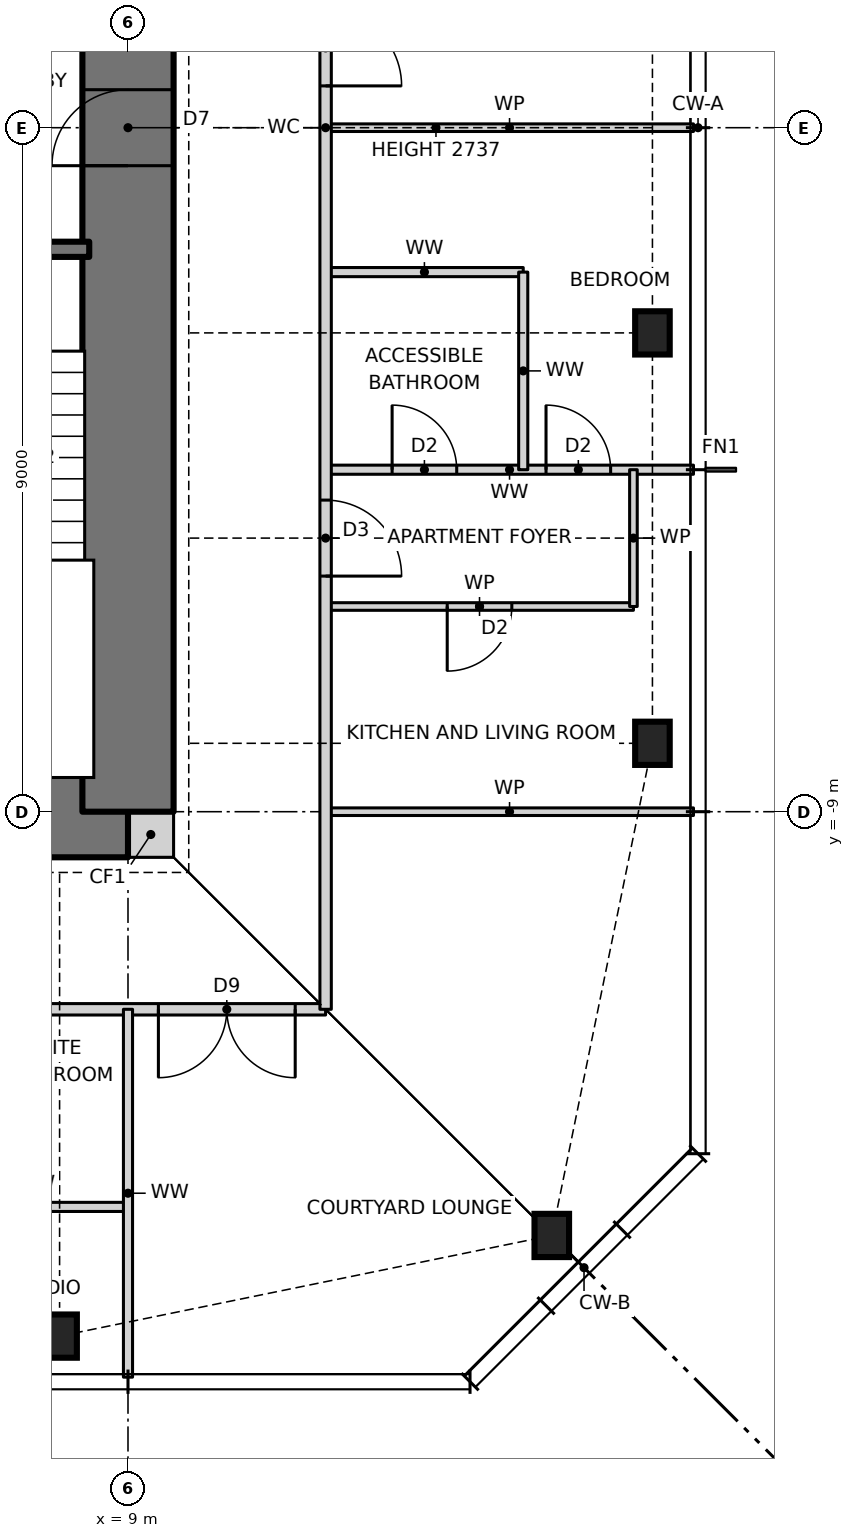
"""IFC4 building model, lengths in metres.
Left out: names, types, materials, properties, quantities, classifications, styles, units other than length and angle.
Written with IfcOpenShell. Run it as: python <this file> out.ifc"""

import sys

from ifc_helpers import new_model, si_unit, direction, frame, frame_2d, origin, origin_2d, place, context, subcontext, project, spatial, rectangle, i_section, extrude, element, fill, save


model = new_model("IFC4")
c1 = context("Model", 3, precision=1e-05, world=origin(), true_north=direction((0.0, 1.0)))
c2 = subcontext(c1, "Body", "Model", "MODEL_VIEW")
j1 = project(units=[si_unit("LENGTHUNIT", "METRE"), si_unit("PLANEANGLEUNIT", "RADIAN")], contexts=[c1])
p1 = place(None, origin())
s1 = spatial("IfcSite", under=j1, at=p1, CompositionType="ELEMENT")
p2 = place(p1, origin())
s2 = spatial("IfcBuilding", under=s1, at=p2, CompositionType="ELEMENT")
p3 = place(p2, frame((0.0, 0.0, 225.5)))
s3 = spatial("IfcBuildingStorey", under=s2, at=p3, CompositionType="ELEMENT", Elevation=225.5)
for number, where, z_axis, x_axis in (
    (1, (8.1, -15.9, 0.0), (0.0, 0.0, 1.0), (1.0, 0.0, 0.0)),
    (2, (14.576, -14.576, 0.0), (0.0, 0.0, 1.0), (1.0, 0.0, 0.0)),
    (3, (15.9, -8.1, 0.0), (0.0, 0.0, 1.0), (1.0, 0.0, 0.0)),
    (4, (15.9, -2.7, 0.0), (0.0, 0.0, 1.0), (1.0, 0.0, 0.0)),
):
    element("IfcColumn", number, at=place(p3, frame(where, z_axis=z_axis, x_axis=x_axis)), inside=s3, PredefinedType="COLUMN", context=c2, shape_type="SweptSolid", body=[
        extrude(i_section(OverallWidth=0.455, OverallDepth=0.569, WebThickness=0.078, FlangeThickness=0.125, at=origin_2d()), origin(), (0.0, 0.0, 1.0), 3.5),
    ])
p4 = place(p3, frame((9.0, -9.3, 0.0), z_axis=(0.0, 0.0, 1.0), x_axis=(1.0, 0.0, 0.0)))
e5 = element("IfcWall", 5, at=p4, inside=s3, PredefinedType="SOLIDWALL", context=c2, shape_type="SweptSolid", body=[
    extrude(rectangle(XDim=0.6, YDim=0.6, at=frame_2d((0.3, 0.0))), origin(), (0.0, 0.0, 1.0), 3.5),
])
p5 = place(p3, frame((-9.0, -9.0, 0.0), z_axis=(0.0, 0.0, 1.0), x_axis=(1.0, 0.0, 0.0)))
e6 = element("IfcWall", 6, at=p5, inside=s3, PredefinedType="SHEAR", context=c2, shape_type="SweptSolid", body=[
    extrude(rectangle(XDim=18.0, YDim=1.2, at=frame_2d((9.0, 0.0))), origin(), (0.0, 0.0, 1.0), 3.5),
])
p6 = place(p5, frame((3.775, 0.0, 0.0)))
e7 = element("IfcOpeningElement", 7, at=p6, cuts=e6, PredefinedType="OPENING", context=c2, shape_type="SweptSolid", body=[
    extrude(rectangle(XDim=0.9, YDim=2.1, at=frame_2d((0.45, 1.05))), frame((0.0, 0.61, 0.0), z_axis=(0.0, -1.0, 0.0), x_axis=(1.0, 0.0, 0.0)), (0.0, 0.0, 1.0), 1.22),
])
p7 = place(p5, frame((10.625, 0.0, 0.0)))
e8 = element("IfcOpeningElement", 8, at=p7, cuts=e6, PredefinedType="OPENING", context=c2, shape_type="SweptSolid", body=[
    extrude(rectangle(XDim=0.9, YDim=2.1, at=frame_2d((0.45, 1.05))), frame((0.0, 0.61, 0.0), z_axis=(0.0, -1.0, 0.0), x_axis=(1.0, 0.0, 0.0)), (0.0, 0.0, 1.0), 1.22),
])
p8 = place(p3, frame((9.0, -9.0, 0.0), z_axis=(0.0, 0.0, 1.0), x_axis=(0.0, 1.0, 0.0)))
e9 = element("IfcWall", 9, at=p8, inside=s3, PredefinedType="SHEAR", context=c2, shape_type="SweptSolid", body=[
    extrude(rectangle(XDim=18.0, YDim=1.2, at=frame_2d((9.0, 0.0))), origin(), (0.0, 0.0, 1.0), 3.5),
])
p9 = place(p8, frame((8.5, 0.0, 0.0)))
e10 = element("IfcOpeningElement", 10, at=p9, cuts=e9, PredefinedType="OPENING", context=c2, shape_type="SweptSolid", body=[
    extrude(rectangle(XDim=1.0, YDim=2.1, at=frame_2d((0.5, 1.05))), frame((0.0, 0.61, 0.0), z_axis=(0.0, -1.0, 0.0), x_axis=(1.0, 0.0, 0.0)), (0.0, 0.0, 1.0), 1.22),
])
p10 = place(p3, frame((6.6, -14.2, 0.0), z_axis=(0.0, 0.0, 1.0), x_axis=(1.0, 0.0, 0.0)))
e11 = element("IfcWall", 11, at=p10, inside=s3, PredefinedType="PARTITIONING", context=c2, shape_type="SweptSolid", body=[
    extrude(rectangle(XDim=2.4, YDim=0.12, at=frame_2d((1.2, 0.0))), origin(), (0.0, 0.0, 1.0), 3.27),
])
p11 = place(p3, frame((-11.6, -11.6, 0.0), z_axis=(0.0, 0.0, 1.0), x_axis=(1.0, 0.0, 0.0)))
e12 = element("IfcWall", 12, at=p11, inside=s3, PredefinedType="PARTITIONING", context=c2, shape_type="SweptSolid", body=[
    extrude(rectangle(XDim=23.2, YDim=0.15, at=frame_2d((11.6, 0.0))), origin(), (0.0, 0.0, 1.0), 3.27),
])
p12 = place(p11, frame((5.55, 0.0, 0.0)))
e13 = element("IfcOpeningElement", 13, at=p12, cuts=e12, PredefinedType="OPENING", context=c2, shape_type="SweptSolid", body=[
    extrude(rectangle(XDim=1.0, YDim=2.1, at=frame_2d((0.5, 1.05))), frame((0.0, 0.085, 0.0), z_axis=(0.0, -1.0, 0.0), x_axis=(1.0, 0.0, 0.0)), (0.0, 0.0, 1.0), 0.17),
])
p13 = place(p11, frame((7.65, 0.0, 0.0)))
e14 = element("IfcOpeningElement", 14, at=p13, cuts=e12, PredefinedType="OPENING", context=c2, shape_type="SweptSolid", body=[
    extrude(rectangle(XDim=1.0, YDim=2.1, at=frame_2d((0.5, 1.05))), frame((0.0, 0.085, 0.0), z_axis=(0.0, -1.0, 0.0), x_axis=(1.0, 0.0, 0.0)), (0.0, 0.0, 1.0), 0.17),
])
p14 = place(p11, frame((14.55, 0.0, 0.0)))
e15 = element("IfcOpeningElement", 15, at=p14, cuts=e12, PredefinedType="OPENING", context=c2, shape_type="SweptSolid", body=[
    extrude(rectangle(XDim=1.0, YDim=2.1, at=frame_2d((0.5, 1.05))), frame((0.0, 0.085, 0.0), z_axis=(0.0, -1.0, 0.0), x_axis=(1.0, 0.0, 0.0)), (0.0, 0.0, 1.0), 0.17),
])
p15 = place(p11, frame((16.65, 0.0, 0.0)))
e16 = element("IfcOpeningElement", 16, at=p15, cuts=e12, PredefinedType="OPENING", context=c2, shape_type="SweptSolid", body=[
    extrude(rectangle(XDim=1.0, YDim=2.1, at=frame_2d((0.5, 1.05))), frame((0.0, 0.085, 0.0), z_axis=(0.0, -1.0, 0.0), x_axis=(1.0, 0.0, 0.0)), (0.0, 0.0, 1.0), 0.17),
])
p16 = place(p11, frame((21.0, 0.0, 0.0)))
e17 = element("IfcOpeningElement", 17, at=p16, cuts=e12, PredefinedType="OPENING", context=c2, shape_type="SweptSolid", body=[
    extrude(rectangle(XDim=1.8, YDim=2.1, at=frame_2d((0.9, 1.05))), frame((0.0, 0.085, 0.0), z_axis=(0.0, -1.0, 0.0), x_axis=(1.0, 0.0, 0.0)), (0.0, 0.0, 1.0), 0.17),
])
p17 = place(p3, frame((11.6, -9.0, 0.0), z_axis=(0.0, 0.0, 1.0), x_axis=(1.0, 0.0, 0.0)))
e18 = element("IfcWall", 18, at=p17, inside=s3, PredefinedType="PARTITIONING", context=c2, shape_type="SweptSolid", body=[
    extrude(rectangle(XDim=4.84, YDim=0.1, at=frame_2d((2.42, 0.0))), origin(), (0.0, 0.0, 1.0), 3.27),
])
p18 = place(p3, frame((11.6, -6.3, 0.0), z_axis=(0.0, 0.0, 1.0), x_axis=(1.0, 0.0, 0.0)))
e19 = element("IfcWall", 19, at=p18, inside=s3, PredefinedType="PARTITIONING", context=c2, shape_type="SweptSolid", body=[
    extrude(rectangle(XDim=4.05, YDim=0.1, at=frame_2d((2.025, 0.0))), origin(), (0.0, 0.0, 1.0), 3.27),
])
p19 = place(p18, frame((1.6, 0.0, 0.0)))
e20 = element("IfcOpeningElement", 20, at=p19, cuts=e19, PredefinedType="OPENING", context=c2, shape_type="SweptSolid", body=[
    extrude(rectangle(XDim=0.85, YDim=2.1, at=frame_2d((0.425, 1.05))), frame((0.0, 0.06, 0.0), z_axis=(0.0, -1.0, 0.0), x_axis=(1.0, 0.0, 0.0)), (0.0, 0.0, 1.0), 0.12),
])
p20 = place(p3, frame((11.6, -4.5, 0.0), z_axis=(0.0, 0.0, 1.0), x_axis=(1.0, 0.0, 0.0)))
e21 = element("IfcWall", 21, at=p20, inside=s3, PredefinedType="PARTITIONING", context=c2, shape_type="SweptSolid", body=[
    extrude(rectangle(XDim=4.84, YDim=0.12, at=frame_2d((2.42, 0.0))), origin(), (0.0, 0.0, 1.0), 3.27),
])
p21 = place(p20, frame((2.9, 0.0, 0.0)))
e22 = element("IfcOpeningElement", 22, at=p21, cuts=e21, PredefinedType="OPENING", context=c2, shape_type="SweptSolid", body=[
    extrude(rectangle(XDim=0.85, YDim=2.1, at=frame_2d((0.425, 1.05))), frame((0.0, 0.07, 0.0), z_axis=(0.0, -1.0, 0.0), x_axis=(1.0, 0.0, 0.0)), (0.0, 0.0, 1.0), 0.14),
])
p22 = place(p20, frame((0.875, 0.0, 0.0)))
e23 = element("IfcOpeningElement", 23, at=p22, cuts=e21, PredefinedType="OPENING", context=c2, shape_type="SweptSolid", body=[
    extrude(rectangle(XDim=0.85, YDim=2.1, at=frame_2d((0.425, 1.05))), frame((0.0, 0.07, 0.0), z_axis=(0.0, -1.0, 0.0), x_axis=(1.0, 0.0, 0.0)), (0.0, 0.0, 1.0), 0.14),
])
p23 = place(p3, frame((11.6, -1.9, 0.0), z_axis=(0.0, 0.0, 1.0), x_axis=(1.0, 0.0, 0.0)))
e24 = element("IfcWall", 24, at=p23, inside=s3, PredefinedType="PARTITIONING", context=c2, shape_type="SweptSolid", body=[
    extrude(rectangle(XDim=2.6, YDim=0.12, at=frame_2d((1.3, 0.0))), origin(), (0.0, 0.0, 1.0), 3.27),
])
p24 = place(p3, frame((-8.49, -1.6, 0.0), z_axis=(0.0, 0.0, 1.0), x_axis=(1.0, 0.0, 0.0)))
e25 = element("IfcWall", 25, at=p24, inside=s3, PredefinedType="SOLIDWALL", context=c2, shape_type="SweptSolid", body=[
    extrude(rectangle(XDim=16.98, YDim=0.2, at=frame_2d((8.49, 0.0))), origin(), (0.0, 0.0, 1.0), 3.5),
])
p25 = place(p24, frame((14.81, 0.0, 0.0)))
e26 = element("IfcOpeningElement", 26, at=p25, cuts=e25, PredefinedType="OPENING", context=c2, shape_type="SweptSolid", body=[
    extrude(rectangle(XDim=1.0, YDim=2.1, at=frame_2d((0.5, 1.05))), frame((0.0, 0.11, 0.0), z_axis=(0.0, -1.0, 0.0), x_axis=(1.0, 0.0, 0.0)), (0.0, 0.0, 1.0), 0.22),
])
p26 = place(p24, frame((1.232, 0.0, 0.0)))
e27 = element("IfcOpeningElement", 27, at=p26, cuts=e25, PredefinedType="OPENING", context=c2, shape_type="SweptSolid", body=[
    extrude(rectangle(XDim=0.9, YDim=2.1, at=frame_2d((0.45, 1.05))), frame((0.0, 0.11, 0.0), z_axis=(0.0, -1.0, 0.0), x_axis=(1.0, 0.0, 0.0)), (0.0, 0.0, 1.0), 0.22),
])
p27 = place(p24, frame((4.627, 0.0, 0.0)))
e28 = element("IfcOpeningElement", 28, at=p27, cuts=e25, PredefinedType="OPENING", context=c2, shape_type="SweptSolid", body=[
    extrude(rectangle(XDim=0.9, YDim=2.1, at=frame_2d((0.45, 1.05))), frame((0.0, 0.11, 0.0), z_axis=(0.0, -1.0, 0.0), x_axis=(1.0, 0.0, 0.0)), (0.0, 0.0, 1.0), 0.22),
])
p28 = place(p24, frame((8.052, 0.0, 0.0)))
e29 = element("IfcOpeningElement", 29, at=p28, cuts=e25, PredefinedType="OPENING", context=c2, shape_type="SweptSolid", body=[
    extrude(rectangle(XDim=0.9, YDim=2.1, at=frame_2d((0.45, 1.05))), frame((0.0, 0.11, 0.0), z_axis=(0.0, -1.0, 0.0), x_axis=(1.0, 0.0, 0.0)), (0.0, 0.0, 1.0), 0.22),
])
p29 = place(p24, frame((11.478, 0.0, 0.0)))
e30 = element("IfcOpeningElement", 30, at=p29, cuts=e25, PredefinedType="OPENING", context=c2, shape_type="SweptSolid", body=[
    extrude(rectangle(XDim=0.9, YDim=2.1, at=frame_2d((0.45, 1.05))), frame((0.0, 0.11, 0.0), z_axis=(0.0, -1.0, 0.0), x_axis=(1.0, 0.0, 0.0)), (0.0, 0.0, 1.0), 0.22),
])
p30 = place(p3, frame((11.6, 0.0, 0.0), z_axis=(0.0, 0.0, 1.0), x_axis=(1.0, 0.0, 0.0)))
e31 = element("IfcWall", 31, at=p30, inside=s3, PredefinedType="PARTITIONING", context=c2, shape_type="SweptSolid", body=[
    extrude(rectangle(XDim=4.84, YDim=0.1, at=frame_2d((2.42, 0.0))), origin(), (0.0, 0.0, 1.0), 2.737),
])
p31 = place(p3, frame((15.65, -6.3, 0.0), z_axis=(0.0, 0.0, 1.0), x_axis=(0.0, 1.0, 0.0)))
e32 = element("IfcWall", 32, at=p31, inside=s3, PredefinedType="PARTITIONING", context=c2, shape_type="SweptSolid", body=[
    extrude(rectangle(XDim=1.8, YDim=0.1, at=frame_2d((0.9, 0.0))), origin(), (0.0, 0.0, 1.0), 3.27),
])
p32 = place(p3, frame((14.2, -4.5, 0.0), z_axis=(0.0, 0.0, 1.0), x_axis=(0.0, 1.0, 0.0)))
e33 = element("IfcWall", 33, at=p32, inside=s3, PredefinedType="PARTITIONING", context=c2, shape_type="SweptSolid", body=[
    extrude(rectangle(XDim=2.6, YDim=0.12, at=frame_2d((1.3, 0.0))), origin(), (0.0, 0.0, 1.0), 3.27),
])
p33 = place(p3, frame((11.6, -11.6, 0.0), z_axis=(0.0, 0.0, 1.0), x_axis=(0.0, 1.0, 0.0)))
e34 = element("IfcWall", 34, at=p33, inside=s3, PredefinedType="PARTITIONING", context=c2, shape_type="SweptSolid", body=[
    extrude(rectangle(XDim=23.2, YDim=0.15, at=frame_2d((11.6, 0.0))), origin(), (0.0, 0.0, 1.0), 3.27),
])
p34 = place(p33, frame((5.7, 0.0, 0.0)))
e35 = element("IfcOpeningElement", 35, at=p34, cuts=e34, PredefinedType="OPENING", context=c2, shape_type="SweptSolid", body=[
    extrude(rectangle(XDim=1.0, YDim=2.1, at=frame_2d((0.5, 1.05))), frame((0.0, 0.085, 0.0), z_axis=(0.0, -1.0, 0.0), x_axis=(1.0, 0.0, 0.0)), (0.0, 0.0, 1.0), 0.17),
])
p35 = place(p33, frame((12.15, 0.0, 0.0)))
e36 = element("IfcOpeningElement", 36, at=p35, cuts=e34, PredefinedType="OPENING", context=c2, shape_type="SweptSolid", body=[
    extrude(rectangle(XDim=1.0, YDim=2.1, at=frame_2d((0.5, 1.05))), frame((0.0, 0.085, 0.0), z_axis=(0.0, -1.0, 0.0), x_axis=(1.0, 0.0, 0.0)), (0.0, 0.0, 1.0), 0.17),
])
p36 = place(p33, frame((19.05, 0.0, 0.0)))
e37 = element("IfcOpeningElement", 37, at=p36, cuts=e34, PredefinedType="OPENING", context=c2, shape_type="SweptSolid", body=[
    extrude(rectangle(XDim=1.0, YDim=2.1, at=frame_2d((0.5, 1.05))), frame((0.0, 0.085, 0.0), z_axis=(0.0, -1.0, 0.0), x_axis=(1.0, 0.0, 0.0)), (0.0, 0.0, 1.0), 0.17),
])
p37 = place(p33, frame((21.0, 0.0, 0.0)))
e38 = element("IfcOpeningElement", 38, at=p37, cuts=e34, PredefinedType="OPENING", context=c2, shape_type="SweptSolid", body=[
    extrude(rectangle(XDim=1.8, YDim=2.1, at=frame_2d((0.9, 1.05))), frame((0.0, 0.085, 0.0), z_axis=(0.0, -1.0, 0.0), x_axis=(1.0, 0.0, 0.0)), (0.0, 0.0, 1.0), 0.17),
])
p38 = place(p3, frame((9.0, -16.44, 0.0), z_axis=(0.0, 0.0, 1.0), x_axis=(0.0, 1.0, 0.0)))
e39 = element("IfcWall", 39, at=p38, inside=s3, PredefinedType="PARTITIONING", context=c2, shape_type="SweptSolid", body=[
    extrude(rectangle(XDim=4.84, YDim=0.12, at=frame_2d((2.42, 0.0))), origin(), (0.0, 0.0, 1.0), 3.27),
])
p39 = place(p34, frame((1.0, 0.0, 0.0), z_axis=(0.0, 0.0, 1.0), x_axis=(-1.0, 0.0, 0.0)))
e40 = element("IfcDoor", 40, at=p39, inside=s3, OperationType="SINGLE_SWING_RIGHT", PredefinedType="DOOR", context=c2, shape_type="SweptSolid", body=[
    extrude(rectangle(XDim=1.0, YDim=2.1, at=frame_2d((0.5, 1.05))), frame((0.0, 0.025, 0.0), z_axis=(0.0, -1.0, 0.0), x_axis=(1.0, 0.0, 0.0)), (0.0, 0.0, 1.0), 0.05),
])
fill(e35, e40)
p40 = place(p19, frame((0.85, 0.0, 0.0), z_axis=(0.0, 0.0, 1.0), x_axis=(-1.0, 0.0, 0.0)))
e41 = element("IfcDoor", 41, at=p40, inside=s3, OperationType="SINGLE_SWING_RIGHT", PredefinedType="DOOR", context=c2, shape_type="SweptSolid", body=[
    extrude(rectangle(XDim=0.85, YDim=2.1, at=frame_2d((0.425, 1.05))), frame((0.0, 0.025, 0.0), z_axis=(0.0, -1.0, 0.0), x_axis=(1.0, 0.0, 0.0)), (0.0, 0.0, 1.0), 0.05),
])
fill(e20, e41)
p41 = place(p21, origin())
e42 = element("IfcDoor", 42, at=p41, inside=s3, OperationType="SINGLE_SWING_LEFT", PredefinedType="DOOR", context=c2, shape_type="SweptSolid", body=[
    extrude(rectangle(XDim=0.85, YDim=2.1, at=frame_2d((0.425, 1.05))), frame((0.0, 0.025, 0.0), z_axis=(0.0, -1.0, 0.0), x_axis=(1.0, 0.0, 0.0)), (0.0, 0.0, 1.0), 0.05),
])
fill(e22, e42)
p42 = place(p22, origin())
e43 = element("IfcDoor", 43, at=p42, inside=s3, OperationType="SINGLE_SWING_LEFT", PredefinedType="DOOR", context=c2, shape_type="SweptSolid", body=[
    extrude(rectangle(XDim=0.85, YDim=2.1, at=frame_2d((0.425, 1.05))), frame((0.0, 0.025, 0.0), z_axis=(0.0, -1.0, 0.0), x_axis=(1.0, 0.0, 0.0)), (0.0, 0.0, 1.0), 0.05),
])
fill(e23, e43)
p43 = place(p35, frame((1.0, 0.0, 0.0), z_axis=(0.0, 0.0, 1.0), x_axis=(-1.0, 0.0, 0.0)))
e44 = element("IfcDoor", 44, at=p43, inside=s3, OperationType="SINGLE_SWING_RIGHT", PredefinedType="DOOR", context=c2, shape_type="SweptSolid", body=[
    extrude(rectangle(XDim=1.0, YDim=2.1, at=frame_2d((0.5, 1.05))), frame((0.0, 0.025, 0.0), z_axis=(0.0, -1.0, 0.0), x_axis=(1.0, 0.0, 0.0)), (0.0, 0.0, 1.0), 0.05),
])
fill(e36, e44)
p44 = place(p16, frame((1.8, 0.0, 0.0), z_axis=(0.0, 0.0, 1.0), x_axis=(-1.0, 0.0, 0.0)))
e45 = element("IfcDoor", 45, at=p44, inside=s3, OperationType="DOUBLE_DOOR_SINGLE_SWING", PredefinedType="DOOR", context=c2, shape_type="SweptSolid", body=[
    extrude(rectangle(XDim=1.8, YDim=2.1, at=frame_2d((0.9, 1.05))), frame((0.0, 0.025, 0.0), z_axis=(0.0, -1.0, 0.0), x_axis=(1.0, 0.0, 0.0)), (0.0, 0.0, 1.0), 0.05),
])
fill(e17, e45)
p45 = place(p9, origin())
e46 = element("IfcDoor", 46, at=p45, inside=s3, OperationType="SINGLE_SWING_LEFT", PredefinedType="DOOR", context=c2, shape_type="SweptSolid", body=[
    extrude(rectangle(XDim=1.0, YDim=2.1, at=frame_2d((0.5, 1.05))), frame((0.0, 0.025, 0.0), z_axis=(0.0, -1.0, 0.0), x_axis=(1.0, 0.0, 0.0)), (0.0, 0.0, 1.0), 0.05),
])
fill(e10, e46)
save(model, sys.argv[1])
